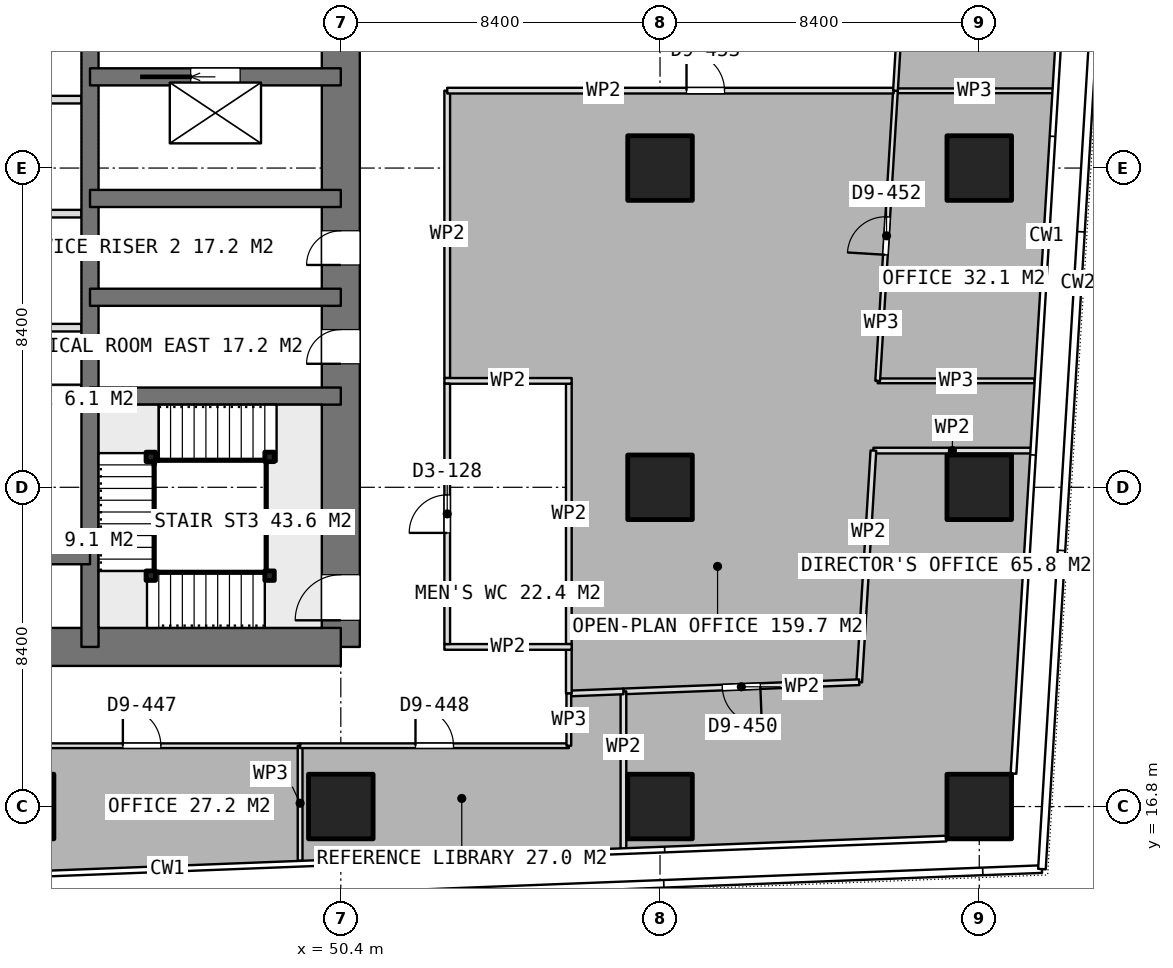
"""IFC4 building model, lengths in metres.
Left out: names, types, materials, properties, quantities, classifications, styles, units other than length and angle.
Written with IfcOpenShell. Run it as: python <this file> out.ifc"""

import sys

from ifc_helpers import new_model, si_unit, direction, frame, frame_2d, origin, origin_2d, place, context, subcontext, project, spatial, rectangle, extrude, element, fill, save


model = new_model("IFC4")
c1 = context("Model", 3, precision=1e-05, world=origin(), true_north=direction((0.0, 1.0)))
c2 = subcontext(c1, "Body", "Model", "MODEL_VIEW")
j1 = project(units=[si_unit("LENGTHUNIT", "METRE"), si_unit("PLANEANGLEUNIT", "RADIAN")], contexts=[c1])
p1 = place(None, origin())
s1 = spatial("IfcSite", under=j1, at=p1, CompositionType="ELEMENT")
p2 = place(p1, origin())
s2 = spatial("IfcBuilding", under=s1, at=p2, CompositionType="ELEMENT")
p3 = place(p2, frame((0.0, 0.0, 121.55)))
s3 = spatial("IfcBuildingStorey", under=s2, at=p3, CompositionType="ELEMENT", Elevation=121.55)
p4 = place(p3, frame((40.0, 21.0, 0.0), z_axis=(0.0, 0.0, 1.0), x_axis=(1.0, 0.0, 0.0)))
e1 = element("IfcWall", 1, at=p4, inside=s3, PredefinedType="SHEAR", context=c2, shape_type="SweptSolid", body=[
    extrude(rectangle(XDim=10.4, YDim=1.0, at=frame_2d((5.2, 0.0))), origin(), (0.0, 0.0, 1.0), 3.75),
])
p5 = place(p3, frame((50.4, 21.0, 0.0), z_axis=(0.0, 0.0, 1.0), x_axis=(0.0, 1.0, 0.0)))
e2 = element("IfcWall", 2, at=p5, inside=s3, PredefinedType="SHEAR", context=c2, shape_type="SweptSolid", body=[
    extrude(rectangle(XDim=25.2, YDim=1.0, at=frame_2d((12.6, 0.0))), origin(), (0.0, 0.0, 1.0), 3.75),
])
p6 = place(p5, frame((16.2, 0.0, 0.0)))
e3 = element("IfcOpeningElement", 3, at=p6, cuts=e2, PredefinedType="OPENING", context=c2, shape_type="SweptSolid", body=[
    extrude(rectangle(XDim=1.2, YDim=2.1, at=frame_2d((0.6, 1.05))), frame((0.0, 0.51, 0.0), z_axis=(0.0, -1.0, 0.0), x_axis=(1.0, 0.0, 0.0)), (0.0, 0.0, 1.0), 1.02),
])
p7 = place(p5, frame((10.05, 0.0, 0.0)))
e4 = element("IfcOpeningElement", 4, at=p7, cuts=e2, PredefinedType="OPENING", context=c2, shape_type="SweptSolid", body=[
    extrude(rectangle(XDim=0.9, YDim=2.1, at=frame_2d((0.45, 1.05))), frame((0.0, 0.51, 0.0), z_axis=(0.0, -1.0, 0.0), x_axis=(1.0, 0.0, 0.0)), (0.0, 0.0, 1.0), 1.02),
])
p8 = place(p5, frame((7.45, 0.0, 0.0)))
e5 = element("IfcOpeningElement", 5, at=p8, cuts=e2, PredefinedType="OPENING", context=c2, shape_type="SweptSolid", body=[
    extrude(rectangle(XDim=0.9, YDim=2.1, at=frame_2d((0.45, 1.05))), frame((0.0, 0.51, 0.0), z_axis=(0.0, -1.0, 0.0), x_axis=(1.0, 0.0, 0.0)), (0.0, 0.0, 1.0), 1.02),
])
p9 = place(p5, frame((0.7, 0.0, 0.0)))
e6 = element("IfcOpeningElement", 6, at=p9, cuts=e2, PredefinedType="OPENING", context=c2, shape_type="SweptSolid", body=[
    extrude(rectangle(XDim=1.2, YDim=2.1, at=frame_2d((0.6, 1.05))), frame((0.0, 0.51, 0.0), z_axis=(0.0, -1.0, 0.0), x_axis=(1.0, 0.0, 0.0)), (0.0, 0.0, 1.0), 1.02),
])
p10 = place(p3, frame((43.8, 21.0, 0.0), z_axis=(0.0, 0.0, 1.0), x_axis=(0.0, 1.0, 0.0)))
e7 = element("IfcWall", 7, at=p10, inside=s3, PredefinedType="SHEAR", context=c2, shape_type="SweptSolid", body=[
    extrude(rectangle(XDim=25.2, YDim=0.45, at=frame_2d((12.6, 0.0))), origin(), (0.0, 0.0, 1.0), 3.75),
])
p11 = place(p3, frame((40.0, 23.4, 0.0), z_axis=(0.0, 0.0, 1.0), x_axis=(1.0, 0.0, 0.0)))
e8 = element("IfcWall", 8, at=p11, inside=s3, PredefinedType="SHEAR", context=c2, shape_type="SweptSolid", body=[
    extrude(rectangle(XDim=3.8, YDim=0.45, at=frame_2d((1.9, 0.0))), origin(), (0.0, 0.0, 1.0), 3.75),
])
for number, where, z_axis, x_axis in (
    (9, (43.8, 27.6, 0.0), (0.0, 0.0, 1.0), (1.0, 0.0, 0.0)),
    (10, (43.8, 30.2, 0.0), (0.0, 0.0, 1.0), (1.0, 0.0, 0.0)),
    (11, (43.8, 32.8, 0.0), (0.0, 0.0, 1.0), (1.0, 0.0, 0.0)),
):
    element("IfcWall", number, at=place(p3, frame(where, z_axis=z_axis, x_axis=x_axis)), inside=s3, PredefinedType="SHEAR", context=c2, shape_type="SweptSolid", body=[
        extrude(rectangle(XDim=6.6, YDim=0.45, at=frame_2d((3.3, 0.0))), origin(), (0.0, 0.0, 1.0), 3.75),
    ])
p12 = place(p3, frame((43.8, 36.0, 0.0), z_axis=(0.0, 0.0, 1.0), x_axis=(1.0, 0.0, 0.0)))
e12 = element("IfcWall", 12, at=p12, inside=s3, PredefinedType="SHEAR", context=c2, shape_type="SweptSolid", body=[
    extrude(rectangle(XDim=6.6, YDim=0.45, at=frame_2d((3.3, 0.0))), origin(), (0.0, 0.0, 1.0), 3.75),
])
p13 = place(p12, frame((2.65, 0.0, 0.0)))
e13 = element("IfcOpeningElement", 13, at=p13, cuts=e12, PredefinedType="OPENING", context=c2, shape_type="SweptSolid", body=[
    extrude(rectangle(XDim=1.3, YDim=2.1, at=frame_2d((0.65, 1.05))), frame((0.0, 0.235, 0.0), z_axis=(0.0, -1.0, 0.0), x_axis=(1.0, 0.0, 0.0)), (0.0, 0.0, 1.0), 0.47),
])
for number, where, z_axis, x_axis in (
    (14, (42.0, 16.8, 0.0), (0.0, 0.0, 1.0), (1.0, 0.0, 0.0)),
    (15, (50.4, 16.8, 0.0), (0.0, 0.0, 1.0), (1.0, 0.0, 0.0)),
    (16, (58.8, 16.8, 0.0), (0.0, 0.0, 1.0), (1.0, 0.0, 0.0)),
    (17, (58.8, 25.2, 0.0), (0.0, 0.0, 1.0), (1.0, 0.0, 0.0)),
    (18, (58.8, 33.6, 0.0), (0.0, 0.0, 1.0), (1.0, 0.0, 0.0)),
    (19, (67.2, 16.8, 0.0), (0.0, 0.0, 1.0), (1.0, 0.0, 0.0)),
    (20, (67.2, 25.2, 0.0), (0.0, 0.0, 1.0), (1.0, 0.0, 0.0)),
    (21, (67.2, 33.6, 0.0), (0.0, 0.0, 1.0), (1.0, 0.0, 0.0)),
):
    element("IfcColumn", number, at=place(p3, frame(where, z_axis=z_axis, x_axis=x_axis)), inside=s3, PredefinedType="COLUMN", context=c2, shape_type="SweptSolid", body=[
        extrude(rectangle(XDim=1.7, YDim=1.7, at=origin_2d()), origin(), (0.0, 0.0, 1.0), 3.75),
    ])
for number, where, z_axis, x_axis in (
    (22, (40.225, 29.4, 0.0), (0.0, 0.0, 1.0), (1.0, 0.0, 0.0)),
    (23, (40.225, 32.4, 0.0), (0.0, 0.0, 1.0), (1.0, 0.0, 0.0)),
    (24, (40.225, 35.4, 0.0), (0.0, 0.0, 1.0), (1.0, 0.0, 0.0)),
    (25, (40.225, 27.8, 0.0), (0.0, 0.0, 1.0), (1.0, 0.0, 0.0)),
):
    element("IfcWall", number, at=place(p3, frame(where, z_axis=z_axis, x_axis=x_axis)), inside=s3, PredefinedType="PARTITIONING", context=c2, shape_type="SweptSolid", body=[
        extrude(rectangle(XDim=3.35, YDim=0.2, at=frame_2d((1.675, 0.0))), origin(), (0.0, 0.0, 1.0), 3.5),
    ])
for number, where, z_axis, x_axis in (
    (26, (53.125, 21.0, 0.0), (0.0, 0.0, 1.0), (1.0, 0.0, 0.0)),
    (27, (53.125, 28.0, 0.0), (0.0, 0.0, 1.0), (1.0, 0.0, 0.0)),
):
    element("IfcWall", number, at=place(p3, frame(where, z_axis=z_axis, x_axis=x_axis)), inside=s3, PredefinedType="PARTITIONING", context=c2, shape_type="SweptSolid", body=[
        extrude(rectangle(XDim=3.35, YDim=0.15, at=frame_2d((1.675, 0.0))), origin(), (0.0, 0.0, 1.0), 3.5),
    ])
p14 = place(p3, frame((53.2, 21.075, 0.0), z_axis=(0.0, 0.0, 1.0), x_axis=(0.0, 1.0, 0.0)))
e28 = element("IfcWall", 28, at=p14, inside=s3, PredefinedType="PARTITIONING", context=c2, shape_type="SweptSolid", body=[
    extrude(rectangle(XDim=6.85, YDim=0.15, at=frame_2d((3.425, 0.0))), origin(), (0.0, 0.0, 1.0), 3.5),
])
p15 = place(p14, frame((2.925, 0.0, 0.0)))
e29 = element("IfcOpeningElement", 29, at=p15, cuts=e28, PredefinedType="OPENING", context=c2, shape_type="SweptSolid", body=[
    extrude(rectangle(XDim=1.0, YDim=2.1, at=frame_2d((0.5, 1.05))), frame((0.0, 0.085, 0.0), z_axis=(0.0, -1.0, 0.0), x_axis=(1.0, 0.0, 0.0)), (0.0, 0.0, 1.0), 0.17),
])
p16 = place(p3, frame((56.4, 21.075, 0.0), z_axis=(0.0, 0.0, 1.0), x_axis=(0.0, 1.0, 0.0)))
e30 = element("IfcWall", 30, at=p16, inside=s3, PredefinedType="PARTITIONING", context=c2, shape_type="SweptSolid", body=[
    extrude(rectangle(XDim=6.85, YDim=0.15, at=frame_2d((3.425, 0.0))), origin(), (0.0, 0.0, 1.0), 3.5),
])
p17 = place(p3, frame((64.995, 35.633, 0.0), z_axis=(0.0, 0.0, 1.0), x_axis=(1.0, 0.0, 0.0)))
e31 = element("IfcWall", 31, at=p17, inside=s3, PredefinedType="PARTITIONING", context=c2, shape_type="SweptSolid", body=[
    extrude(rectangle(XDim=4.157, YDim=0.125, at=frame_2d((2.079, 0.0))), origin(), (0.0, 0.0, 1.0), 3.5),
])
p18 = place(p3, frame((68.655, 28.001, 0.0), z_axis=(0.0, 0.0, 1.0), x_axis=(-1.0, 0.0, 0.0)))
e32 = element("IfcWall", 32, at=p18, inside=s3, PredefinedType="PARTITIONING", context=c2, shape_type="SweptSolid", body=[
    extrude(rectangle(XDim=4.128, YDim=0.125, at=frame_2d((2.064, 0.0))), origin(), (0.0, 0.0, 1.0), 3.5),
])
p19 = place(p3, frame((64.527, 28.001, 0.0), z_axis=(0.0, 0.0, 1.0), x_axis=(0.061207439092, 0.998125067013, 0.0)))
e33 = element("IfcWall", 33, at=p19, inside=s3, PredefinedType="PARTITIONING", context=c2, shape_type="SweptSolid", body=[
    extrude(rectangle(XDim=7.646, YDim=0.125, at=frame_2d((3.823, 0.0))), origin(), (0.0, 0.0, 1.0), 3.5),
])
p20 = place(p19, frame((3.323, 0.0, 0.0)))
e34 = element("IfcOpeningElement", 34, at=p20, cuts=e33, PredefinedType="OPENING", context=c2, shape_type="SweptSolid", body=[
    extrude(rectangle(XDim=1.0, YDim=2.1, at=frame_2d((0.5, 1.05))), frame((0.0, 0.073, 0.0), z_axis=(0.0, -1.0, 0.0), x_axis=(1.0, 0.0, 0.0)), (0.0, 0.0, 1.0), 0.145),
])
p21 = place(p3, frame((64.995, 35.634, 0.0), z_axis=(0.0, 0.0, 1.0), x_axis=(0.061030858212, 0.998135879701, 0.0)))
e35 = element("IfcWall", 35, at=p21, inside=s3, PredefinedType="PARTITIONING", context=c2, shape_type="SweptSolid", body=[
    extrude(rectangle(XDim=1.128, YDim=0.125, at=frame_2d((0.564, 0.0))), origin(), (0.0, 0.0, 1.0), 3.5),
])
p22 = place(p3, frame((53.2, 28.075, 0.0), z_axis=(0.0, 0.0, 1.0), x_axis=(0.0, 1.0, 0.0)))
e36 = element("IfcWall", 36, at=p22, inside=s3, PredefinedType="PARTITIONING", context=c2, shape_type="SweptSolid", body=[
    extrude(rectangle(XDim=7.562, YDim=0.15, at=frame_2d((3.781, 0.0))), origin(), (0.0, 0.0, 1.0), 3.5),
])
p23 = place(p3, frame((53.2, 35.637, 0.0), z_axis=(0.0, 0.0, 1.0), x_axis=(1.0, 0.0, 0.0)))
e37 = element("IfcWall", 37, at=p23, inside=s3, PredefinedType="PARTITIONING", context=c2, shape_type="SweptSolid", body=[
    extrude(rectangle(XDim=11.746, YDim=0.15, at=frame_2d((5.873, 0.0))), origin(), (0.0, 0.0, 1.0), 3.5),
])
p24 = place(p23, frame((6.297, 0.0, 0.0)))
e38 = element("IfcOpeningElement", 38, at=p24, cuts=e37, PredefinedType="OPENING", context=c2, shape_type="SweptSolid", body=[
    extrude(rectangle(XDim=1.0, YDim=2.1, at=frame_2d((0.5, 1.05))), frame((0.0, 0.085, 0.0), z_axis=(0.0, -1.0, 0.0), x_axis=(1.0, 0.0, 0.0)), (0.0, 0.0, 1.0), 0.17),
])
p25 = place(p3, frame((68.572, 26.166, 0.0), z_axis=(0.0, 0.0, 1.0), x_axis=(-1.0, 0.0, 0.0)))
e39 = element("IfcWall", 39, at=p25, inside=s3, PredefinedType="PARTITIONING", context=c2, shape_type="SweptSolid", body=[
    extrude(rectangle(XDim=4.157, YDim=0.15, at=frame_2d((2.079, 0.0))), origin(), (0.0, 0.0, 1.0), 3.5),
])
p26 = place(p3, frame((64.415, 26.166, 0.0), z_axis=(0.0, 0.0, 1.0), x_axis=(-0.061250692479, -0.99812241367, 0.0)))
e40 = element("IfcWall", 40, at=p26, inside=s3, PredefinedType="PARTITIONING", context=c2, shape_type="SweptSolid", body=[
    extrude(rectangle(XDim=6.106, YDim=0.15, at=frame_2d((3.053, 0.0))), origin(), (0.0, 0.0, 1.0), 3.5),
])
p27 = place(p3, frame((64.041, 20.071, 0.0), z_axis=(0.0, 0.0, 1.0), x_axis=(-0.999246582692, -0.038810655482, 0.0)))
e41 = element("IfcWall", 41, at=p27, inside=s3, PredefinedType="PARTITIONING", context=c2, shape_type="SweptSolid", body=[
    extrude(rectangle(XDim=6.209, YDim=0.15, at=frame_2d((3.104, 0.0))), origin(), (0.0, 0.0, 1.0), 3.5),
])
p28 = place(p27, frame((2.604, 0.0, 0.0)))
e42 = element("IfcOpeningElement", 42, at=p28, cuts=e41, PredefinedType="OPENING", context=c2, shape_type="SweptSolid", body=[
    extrude(rectangle(XDim=1.0, YDim=2.1, at=frame_2d((0.5, 1.05))), frame((0.0, 0.085, 0.0), z_axis=(0.0, -1.0, 0.0), x_axis=(1.0, 0.0, 0.0)), (0.0, 0.0, 1.0), 0.17),
])
p29 = place(p3, frame((57.837, 19.83, 0.0), z_axis=(0.0, 0.0, 1.0), x_axis=(0.0, -1.0, 0.0)))
e43 = element("IfcWall", 43, at=p29, inside=s3, PredefinedType="PARTITIONING", context=c2, shape_type="SweptSolid", body=[
    extrude(rectangle(XDim=4.154, YDim=0.15, at=frame_2d((2.077, 0.0))), origin(), (0.0, 0.0, 1.0), 3.5),
])
p30 = place(p3, frame((57.836, 19.83, 0.0), z_axis=(0.0, 0.0, 1.0), x_axis=(-0.99923637883, -0.039072486761, 0.0)))
e44 = element("IfcWall", 44, at=p30, inside=s3, PredefinedType="PARTITIONING", context=c2, shape_type="SweptSolid", body=[
    extrude(rectangle(XDim=1.437, YDim=0.15, at=frame_2d((0.719, 0.0))), origin(), (0.0, 0.0, 1.0), 3.5),
])
p31 = place(p3, frame((56.4, 19.774, 0.0), z_axis=(0.0, 0.0, 1.0), x_axis=(0.0, 1.0, 0.0)))
e45 = element("IfcWall", 45, at=p31, inside=s3, PredefinedType="PARTITIONING", context=c2, shape_type="SweptSolid", body=[
    extrude(rectangle(XDim=1.301, YDim=0.15, at=frame_2d((0.65, 0.0))), origin(), (0.0, 0.0, 1.0), 3.5),
])
p32 = place(p3, frame((41.002, 18.4, 0.0), z_axis=(0.0, 0.0, 1.0), x_axis=(1.0, 0.0, 0.0)))
e46 = element("IfcWall", 46, at=p32, inside=s3, PredefinedType="PARTITIONING", context=c2, shape_type="SweptSolid", body=[
    extrude(rectangle(XDim=8.327, YDim=0.125, at=frame_2d((4.164, 0.0))), origin(), (0.0, 0.0, 1.0), 3.5),
])
p33 = place(p32, frame((3.663, 0.0, 0.0)))
e47 = element("IfcOpeningElement", 47, at=p33, cuts=e46, PredefinedType="OPENING", context=c2, shape_type="SweptSolid", body=[
    extrude(rectangle(XDim=1.0, YDim=2.1, at=frame_2d((0.5, 1.05))), frame((0.0, 0.073, 0.0), z_axis=(0.0, -1.0, 0.0), x_axis=(1.0, 0.0, 0.0)), (0.0, 0.0, 1.0), 0.145),
])
p34 = place(p3, frame((49.329, 18.4, 0.0), z_axis=(0.0, 0.0, 1.0), x_axis=(0.0, -1.0, 0.0)))
e48 = element("IfcWall", 48, at=p34, inside=s3, PredefinedType="PARTITIONING", context=c2, shape_type="SweptSolid", body=[
    extrude(rectangle(XDim=3.025, YDim=0.125, at=frame_2d((1.512, 0.0))), origin(), (0.0, 0.0, 1.0), 3.5),
])
p35 = place(p3, frame((49.33, 18.4, 0.0), z_axis=(0.0, 0.0, 1.0), x_axis=(1.0, 0.0, 0.0)))
e49 = element("IfcWall", 49, at=p35, inside=s3, PredefinedType="PARTITIONING", context=c2, shape_type="SweptSolid", body=[
    extrude(rectangle(XDim=7.07, YDim=0.125, at=frame_2d((3.535, 0.0))), origin(), (0.0, 0.0, 1.0), 3.5),
])
p36 = place(p35, frame((3.035, 0.0, 0.0)))
e50 = element("IfcOpeningElement", 50, at=p36, cuts=e49, PredefinedType="OPENING", context=c2, shape_type="SweptSolid", body=[
    extrude(rectangle(XDim=1.0, YDim=2.1, at=frame_2d((0.5, 1.05))), frame((0.0, 0.073, 0.0), z_axis=(0.0, -1.0, 0.0), x_axis=(1.0, 0.0, 0.0)), (0.0, 0.0, 1.0), 0.145),
])
p37 = place(p3, frame((56.4, 18.4, 0.0), z_axis=(0.0, 0.0, 1.0), x_axis=(0.0, 1.0, 0.0)))
e51 = element("IfcWall", 51, at=p37, inside=s3, PredefinedType="PARTITIONING", context=c2, shape_type="SweptSolid", body=[
    extrude(rectangle(XDim=1.374, YDim=0.125, at=frame_2d((0.687, 0.0))), origin(), (0.0, 0.0, 1.0), 3.5),
])
for number, where, z_axis, x_axis in (
    (52, (48.525, 22.875, 0.0), (0.0, 0.0, 1.0), (1.0, 0.0, 0.0)),
    (53, (45.4, 22.875, 0.0), (0.0, 0.0, 1.0), (1.0, 0.0, 0.0)),
    (54, (45.4, 26.0, 0.0), (0.0, 0.0, 1.0), (1.0, 0.0, 0.0)),
    (55, (48.525, 26.0, 0.0), (0.0, 0.0, 1.0), (1.0, 0.0, 0.0)),
):
    element("IfcColumn", number, at=place(p3, frame(where, z_axis=z_axis, x_axis=x_axis)), inside=s3, PredefinedType="COLUMN", context=c2, shape_type="SweptSolid", body=[
        extrude(rectangle(XDim=0.25, YDim=0.25, at=origin_2d()), origin(), (0.0, 0.0, 1.0), 3.75),
    ])
p38 = place(p7, origin())
e56 = element("IfcDoor", 56, at=p38, inside=s3, OperationType="SINGLE_SWING_LEFT", PredefinedType="DOOR", context=c2, shape_type="SweptSolid", body=[
    extrude(rectangle(XDim=0.9, YDim=2.1, at=frame_2d((0.45, 1.05))), frame((0.0, 0.025, 0.0), z_axis=(0.0, -1.0, 0.0), x_axis=(1.0, 0.0, 0.0)), (0.0, 0.0, 1.0), 0.05),
])
fill(e4, e56)
p39 = place(p8, origin())
e57 = element("IfcDoor", 57, at=p39, inside=s3, OperationType="SINGLE_SWING_LEFT", PredefinedType="DOOR", context=c2, shape_type="SweptSolid", body=[
    extrude(rectangle(XDim=0.9, YDim=2.1, at=frame_2d((0.45, 1.05))), frame((0.0, 0.025, 0.0), z_axis=(0.0, -1.0, 0.0), x_axis=(1.0, 0.0, 0.0)), (0.0, 0.0, 1.0), 0.05),
])
fill(e5, e57)
p40 = place(p13, origin())
e58 = element("IfcDoor", 58, at=p40, inside=s3, OperationType="SLIDING_TO_LEFT", PredefinedType="USERDEFINED", context=c2, shape_type="SweptSolid", body=[
    extrude(rectangle(XDim=1.3, YDim=2.1, at=frame_2d((0.65, 1.05))), frame((0.0, 0.025, 0.0), z_axis=(0.0, -1.0, 0.0), x_axis=(1.0, 0.0, 0.0)), (0.0, 0.0, 1.0), 0.05),
])
fill(e13, e58)
p41 = place(p15, origin())
e59 = element("IfcDoor", 59, at=p41, inside=s3, OperationType="SINGLE_SWING_LEFT", PredefinedType="DOOR", context=c2, shape_type="SweptSolid", body=[
    extrude(rectangle(XDim=1.0, YDim=2.1, at=frame_2d((0.5, 1.05))), frame((0.0, 0.025, 0.0), z_axis=(0.0, -1.0, 0.0), x_axis=(1.0, 0.0, 0.0)), (0.0, 0.0, 1.0), 0.05),
])
fill(e29, e59)
p42 = place(p20, origin())
e60 = element("IfcDoor", 60, at=p42, inside=s3, OperationType="SINGLE_SWING_LEFT", PredefinedType="DOOR", context=c2, shape_type="SweptSolid", body=[
    extrude(rectangle(XDim=1.0, YDim=2.1, at=frame_2d((0.5, 1.05))), frame((0.0, 0.025, 0.0), z_axis=(0.0, -1.0, 0.0), x_axis=(1.0, 0.0, 0.0)), (0.0, 0.0, 1.0), 0.05),
])
fill(e34, e60)
p43 = place(p24, origin())
e61 = element("IfcDoor", 61, at=p43, inside=s3, OperationType="SINGLE_SWING_LEFT", PredefinedType="DOOR", context=c2, shape_type="SweptSolid", body=[
    extrude(rectangle(XDim=1.0, YDim=2.1, at=frame_2d((0.5, 1.05))), frame((0.0, 0.025, 0.0), z_axis=(0.0, -1.0, 0.0), x_axis=(1.0, 0.0, 0.0)), (0.0, 0.0, 1.0), 0.05),
])
fill(e38, e61)
p44 = place(p33, origin())
e62 = element("IfcDoor", 62, at=p44, inside=s3, OperationType="SINGLE_SWING_LEFT", PredefinedType="DOOR", context=c2, shape_type="SweptSolid", body=[
    extrude(rectangle(XDim=1.0, YDim=2.1, at=frame_2d((0.5, 1.05))), frame((0.0, 0.025, 0.0), z_axis=(0.0, -1.0, 0.0), x_axis=(1.0, 0.0, 0.0)), (0.0, 0.0, 1.0), 0.05),
])
fill(e47, e62)
p45 = place(p36, origin())
e63 = element("IfcDoor", 63, at=p45, inside=s3, OperationType="SINGLE_SWING_LEFT", PredefinedType="DOOR", context=c2, shape_type="SweptSolid", body=[
    extrude(rectangle(XDim=1.0, YDim=2.1, at=frame_2d((0.5, 1.05))), frame((0.0, 0.025, 0.0), z_axis=(0.0, -1.0, 0.0), x_axis=(1.0, 0.0, 0.0)), (0.0, 0.0, 1.0), 0.05),
])
fill(e50, e63)
p46 = place(p28, origin())
e64 = element("IfcDoor", 64, at=p46, inside=s3, OperationType="SINGLE_SWING_LEFT", PredefinedType="DOOR", context=c2, shape_type="SweptSolid", body=[
    extrude(rectangle(XDim=1.0, YDim=2.1, at=frame_2d((0.5, 1.05))), frame((0.0, 0.025, 0.0), z_axis=(0.0, -1.0, 0.0), x_axis=(1.0, 0.0, 0.0)), (0.0, 0.0, 1.0), 0.05),
])
fill(e42, e64)
p47 = place(p9, origin())
e65 = element("IfcDoor", 65, at=p47, inside=s3, OperationType="SINGLE_SWING_RIGHT", PredefinedType="DOOR", context=c2, shape_type="SweptSolid", body=[
    extrude(rectangle(XDim=1.2, YDim=2.1, at=frame_2d((0.6, 1.05))), frame((0.0, 0.025, 0.0), z_axis=(0.0, -1.0, 0.0), x_axis=(1.0, 0.0, 0.0)), (0.0, 0.0, 1.0), 0.05),
])
fill(e6, e65)
save(model, sys.argv[1])
